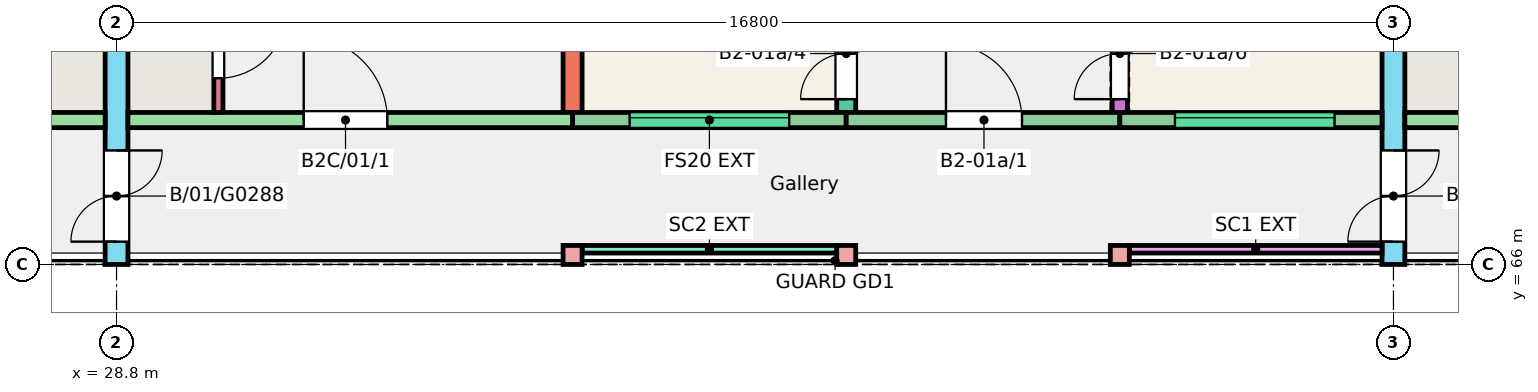
"""IFC4 building model, lengths in metres.
Left out: names, types, materials, properties, quantities, classifications, styles, units other than length and angle.
Written with IfcOpenShell. Run it as: python <this file> out.ifc"""

import sys

from ifc_helpers import new_model, si_unit, direction, frame, frame_2d, origin, origin_2d, place, context, subcontext, project, spatial, rectangle, extrude, element, fill, save


model = new_model("IFC4")
c1 = context("Model", 3, precision=1e-05, world=origin(), true_north=direction((0.0, 1.0)))
c2 = subcontext(c1, "Body", "Model", "MODEL_VIEW")
j1 = project(units=[si_unit("LENGTHUNIT", "METRE"), si_unit("PLANEANGLEUNIT", "RADIAN")], contexts=[c1])
p1 = place(None, origin())
s1 = spatial("IfcSite", under=j1, at=p1, CompositionType="ELEMENT")
p2 = place(p1, origin())
s2 = spatial("IfcBuilding", under=s1, at=p2, CompositionType="ELEMENT")
p3 = place(p2, frame((0.0, 0.0, 3.0)))
s3 = spatial("IfcBuildingStorey", under=s2, at=p3, CompositionType="ELEMENT", Elevation=3.0)
p4 = place(p3, frame((28.8, 66.0, 0.0), z_axis=(0.0, 0.0, 1.0), x_axis=(0.0, 1.0, 0.0)))
e1 = element("IfcWall", 1, at=p4, inside=s3, PredefinedType="SHEAR", context=c2, shape_type="SweptSolid", body=[
    extrude(rectangle(XDim=11.0, YDim=0.3, at=frame_2d((5.5, 0.0))), origin(), (0.0, 0.0, 1.0), 3.0),
])
p5 = place(p4, frame((0.3, 0.0, 0.0)))
e2 = element("IfcOpeningElement", 2, at=p5, cuts=e1, PredefinedType="OPENING", context=c2, shape_type="SweptSolid", body=[
    extrude(rectangle(XDim=1.2, YDim=2.1, at=frame_2d((0.6, 1.05))), frame((0.0, 0.16, 0.0), z_axis=(0.0, -1.0, 0.0), x_axis=(1.0, 0.0, 0.0)), (0.0, 0.0, 1.0), 0.32),
])
p6 = place(p3, frame((34.8, 68.0, 0.0), z_axis=(0.0, 0.0, 1.0), x_axis=(0.0, 1.0, 0.0)))
e3 = element("IfcWall", 3, at=p6, inside=s3, PredefinedType="SHEAR", context=c2, shape_type="SweptSolid", body=[
    extrude(rectangle(XDim=9.0, YDim=0.25, at=frame_2d((4.5, 0.0))), origin(), (0.0, 0.0, 1.0), 3.0),
])
p7 = place(p3, frame((38.4, 68.0, 0.0), z_axis=(0.0, 0.0, 1.0), x_axis=(0.0, 1.0, 0.0)))
e4 = element("IfcWall", 4, at=p7, inside=s3, PredefinedType="SHEAR", context=c2, shape_type="SweptSolid", body=[
    extrude(rectangle(XDim=9.0, YDim=0.25, at=frame_2d((4.5, 0.0))), origin(), (0.0, 0.0, 1.0), 3.0),
])
p8 = place(p7, frame((0.175, 0.0, 0.0)))
e5 = element("IfcOpeningElement", 5, at=p8, cuts=e4, PredefinedType="OPENING", context=c2, shape_type="SweptSolid", body=[
    extrude(rectangle(XDim=1.2, YDim=2.1, at=frame_2d((0.6, 1.05))), frame((0.0, 0.135, 0.0), z_axis=(0.0, -1.0, 0.0), x_axis=(1.0, 0.0, 0.0)), (0.0, 0.0, 1.0), 0.27),
])
p9 = place(p7, frame((6.4, 0.0, 0.0)))
e6 = element("IfcOpeningElement", 6, at=p9, cuts=e4, PredefinedType="OPENING", context=c2, shape_type="SweptSolid", body=[
    extrude(rectangle(XDim=1.2, YDim=2.1, at=frame_2d((0.6, 1.05))), frame((0.0, 0.135, 0.0), z_axis=(0.0, -1.0, 0.0), x_axis=(1.0, 0.0, 0.0)), (0.0, 0.0, 1.0), 0.27),
])
p10 = place(p3, frame((42.0, 68.0, 0.0), z_axis=(0.0, 0.0, 1.0), x_axis=(0.0, 1.0, 0.0)))
e7 = element("IfcWall", 7, at=p10, inside=s3, PredefinedType="SHEAR", context=c2, shape_type="SweptSolid", body=[
    extrude(rectangle(XDim=9.0, YDim=0.2, at=frame_2d((4.5, 0.0))), origin(), (0.0, 0.0, 1.0), 3.0),
])
p11 = place(p10, frame((0.175, 0.0, 0.0)))
e8 = element("IfcOpeningElement", 8, at=p11, cuts=e7, PredefinedType="OPENING", context=c2, shape_type="SweptSolid", body=[
    extrude(rectangle(XDim=1.2, YDim=2.1, at=frame_2d((0.6, 1.05))), frame((0.0, 0.11, 0.0), z_axis=(0.0, -1.0, 0.0), x_axis=(1.0, 0.0, 0.0)), (0.0, 0.0, 1.0), 0.22),
])
p12 = place(p10, frame((6.4, 0.0, 0.0)))
e9 = element("IfcOpeningElement", 9, at=p12, cuts=e7, PredefinedType="OPENING", context=c2, shape_type="SweptSolid", body=[
    extrude(rectangle(XDim=1.2, YDim=2.1, at=frame_2d((0.6, 1.05))), frame((0.0, 0.11, 0.0), z_axis=(0.0, -1.0, 0.0), x_axis=(1.0, 0.0, 0.0)), (0.0, 0.0, 1.0), 0.22),
])
p13 = place(p3, frame((45.6, 66.0, 0.0), z_axis=(0.0, 0.0, 1.0), x_axis=(0.0, 1.0, 0.0)))
e10 = element("IfcWall", 10, at=p13, inside=s3, PredefinedType="SHEAR", context=c2, shape_type="SweptSolid", body=[
    extrude(rectangle(XDim=11.0, YDim=0.3, at=frame_2d((5.5, 0.0))), origin(), (0.0, 0.0, 1.0), 3.0),
])
p14 = place(p13, frame((0.3, 0.0, 0.0)))
e11 = element("IfcOpeningElement", 11, at=p14, cuts=e10, PredefinedType="OPENING", context=c2, shape_type="SweptSolid", body=[
    extrude(rectangle(XDim=1.2, YDim=2.1, at=frame_2d((0.6, 1.05))), frame((0.0, 0.16, 0.0), z_axis=(0.0, -1.0, 0.0), x_axis=(1.0, 0.0, 0.0)), (0.0, 0.0, 1.0), 0.32),
])
p15 = place(p3, frame((22.8, 67.9, 0.0), z_axis=(0.0, 0.0, 1.0), x_axis=(1.0, 0.0, 0.0)))
e12 = element("IfcWall", 12, at=p15, inside=s3, PredefinedType="SHEAR", context=c2, shape_type="SweptSolid", body=[
    extrude(rectangle(XDim=5.85, YDim=0.2, at=frame_2d((2.925, 0.0))), origin(), (0.0, 0.0, 1.0), 3.0),
])
p16 = place(p15, frame((2.438, 0.0, 0.0)))
e13 = element("IfcOpeningElement", 13, at=p16, cuts=e12, PredefinedType="OPENING", context=c2, shape_type="SweptSolid", body=[
    extrude(rectangle(XDim=1.1, YDim=2.1, at=frame_2d((0.55, 1.05))), frame((0.0, 0.11, 0.0), z_axis=(0.0, -1.0, 0.0), x_axis=(1.0, 0.0, 0.0)), (0.0, 0.0, 1.0), 0.22),
])
p17 = place(p3, frame((28.95, 67.9, 0.0), z_axis=(0.0, 0.0, 1.0), x_axis=(1.0, 0.0, 0.0)))
e14 = element("IfcWall", 14, at=p17, inside=s3, PredefinedType="SHEAR", context=c2, shape_type="SweptSolid", body=[
    extrude(rectangle(XDim=5.85, YDim=0.2, at=frame_2d((2.925, 0.0))), origin(), (0.0, 0.0, 1.0), 3.0),
])
p18 = place(p17, frame((2.312, 0.0, 0.0)))
e15 = element("IfcOpeningElement", 15, at=p18, cuts=e14, PredefinedType="OPENING", context=c2, shape_type="SweptSolid", body=[
    extrude(rectangle(XDim=1.1, YDim=2.1, at=frame_2d((0.55, 1.05))), frame((0.0, 0.11, 0.0), z_axis=(0.0, -1.0, 0.0), x_axis=(1.0, 0.0, 0.0)), (0.0, 0.0, 1.0), 0.22),
])
p19 = place(p3, frame((30.14, 68.0, 0.0), z_axis=(0.0, 0.0, 1.0), x_axis=(0.0, 1.0, 0.0)))
e16 = element("IfcWall", 16, at=p19, inside=s3, PredefinedType="SHEAR", context=c2, shape_type="SweptSolid", body=[
    extrude(rectangle(XDim=1.72, YDim=0.12, at=frame_2d((0.86, 0.0))), origin(), (0.0, 0.0, 1.0), 3.0),
])
p20 = place(p19, frame((0.45, 0.0, 0.0)))
e17 = element("IfcOpeningElement", 17, at=p20, cuts=e16, PredefinedType="OPENING", context=c2, shape_type="SweptSolid", body=[
    extrude(rectangle(XDim=0.9, YDim=2.1, at=frame_2d((0.45, 1.05))), frame((0.0, 0.07, 0.0), z_axis=(0.0, -1.0, 0.0), x_axis=(1.0, 0.0, 0.0)), (0.0, 0.0, 1.0), 0.14),
])
p21 = place(p3, frame((34.8, 67.9, 0.0), z_axis=(0.0, 0.0, 1.0), x_axis=(1.0, 0.0, 0.0)))
e18 = element("IfcWall", 18, at=p21, inside=s3, PredefinedType="SOLIDWALL", context=c2, shape_type="SweptSolid", body=[
    extrude(rectangle(XDim=3.6, YDim=0.2, at=frame_2d((1.8, 0.0))), origin(), (0.0, 0.0, 1.0), 3.0),
])
p22 = place(p21, frame((0.75, 0.0, 1.2)))
e19 = element("IfcOpeningElement", 19, at=p22, cuts=e18, PredefinedType="OPENING", context=c2, shape_type="SweptSolid", body=[
    extrude(rectangle(XDim=2.1, YDim=1.2, at=frame_2d((1.05, 0.6))), frame((0.0, 0.11, 0.0), z_axis=(0.0, -1.0, 0.0), x_axis=(1.0, 0.0, 0.0)), (0.0, 0.0, 1.0), 0.22),
])
p23 = place(p3, frame((38.4, 67.9, 0.0), z_axis=(0.0, 0.0, 1.0), x_axis=(1.0, 0.0, 0.0)))
e20 = element("IfcWall", 20, at=p23, inside=s3, PredefinedType="SOLIDWALL", context=c2, shape_type="SweptSolid", body=[
    extrude(rectangle(XDim=3.6, YDim=0.2, at=frame_2d((1.8, 0.0))), origin(), (0.0, 0.0, 1.0), 3.0),
])
p24 = place(p23, frame((1.312, 0.0, 0.0)))
e21 = element("IfcOpeningElement", 21, at=p24, cuts=e20, PredefinedType="OPENING", context=c2, shape_type="SweptSolid", body=[
    extrude(rectangle(XDim=1.0, YDim=2.1, at=frame_2d((0.5, 1.05))), frame((0.0, 0.11, 0.0), z_axis=(0.0, -1.0, 0.0), x_axis=(1.0, 0.0, 0.0)), (0.0, 0.0, 1.0), 0.22),
])
p25 = place(p3, frame((42.0, 67.9, 0.0), z_axis=(0.0, 0.0, 1.0), x_axis=(1.0, 0.0, 0.0)))
e22 = element("IfcWall", 22, at=p25, inside=s3, PredefinedType="SOLIDWALL", context=c2, shape_type="SweptSolid", body=[
    extrude(rectangle(XDim=3.45, YDim=0.2, at=frame_2d((1.725, 0.0))), origin(), (0.0, 0.0, 1.0), 3.0),
])
p26 = place(p25, frame((0.725, 0.0, 1.2)))
e23 = element("IfcOpeningElement", 23, at=p26, cuts=e22, PredefinedType="OPENING", context=c2, shape_type="SweptSolid", body=[
    extrude(rectangle(XDim=2.1, YDim=1.2, at=frame_2d((1.05, 0.6))), frame((0.0, 0.11, 0.0), z_axis=(0.0, -1.0, 0.0), x_axis=(1.0, 0.0, 0.0)), (0.0, 0.0, 1.0), 0.22),
])
p27 = place(p3, frame((45.75, 67.9, 0.0), z_axis=(0.0, 0.0, 1.0), x_axis=(1.0, 0.0, 0.0)))
e24 = element("IfcWall", 24, at=p27, inside=s3, PredefinedType="SHEAR", context=c2, shape_type="SweptSolid", body=[
    extrude(rectangle(XDim=5.85, YDim=0.2, at=frame_2d((2.925, 0.0))), origin(), (0.0, 0.0, 1.0), 3.0),
])
p28 = place(p27, frame((2.312, 0.0, 0.0)))
e25 = element("IfcOpeningElement", 25, at=p28, cuts=e24, PredefinedType="OPENING", context=c2, shape_type="SweptSolid", body=[
    extrude(rectangle(XDim=1.1, YDim=2.1, at=frame_2d((0.55, 1.05))), frame((0.0, 0.11, 0.0), z_axis=(0.0, -1.0, 0.0), x_axis=(1.0, 0.0, 0.0)), (0.0, 0.0, 1.0), 0.22),
])
for number, where, z_axis, x_axis in (
    (26, (34.8, 66.125, 0.0), (0.0, 0.0, 1.0), (1.0, 0.0, 0.0)),
    (27, (38.4, 66.125, 0.0), (0.0, 0.0, 1.0), (1.0, 0.0, 0.0)),
    (28, (42.0, 66.125, 0.0), (0.0, 0.0, 1.0), (1.0, 0.0, 0.0)),
):
    element("IfcColumn", number, at=place(p3, frame(where, z_axis=z_axis, x_axis=x_axis)), inside=s3, PredefinedType="COLUMN", context=c2, shape_type="SweptSolid", body=[
        extrude(rectangle(XDim=0.25, YDim=0.25, at=origin_2d()), origin(), (0.0, 0.0, 1.0), 3.0),
    ])
p29 = place(p3, frame((34.925, 66.2, 0.0), z_axis=(0.0, 0.0, 1.0), x_axis=(1.0, 0.0, 0.0)))
e29 = element("IfcWall", 29, at=p29, inside=s3, PredefinedType="SOLIDWALL", context=c2, shape_type="SweptSolid", body=[
    extrude(rectangle(XDim=3.35, YDim=0.1, at=frame_2d((1.675, 0.0))), origin(), (0.0, 0.0, 1.0), 2.45),
])
p30 = place(p3, frame((42.125, 66.2, 0.0), z_axis=(0.0, 0.0, 1.0), x_axis=(1.0, 0.0, 0.0)))
e30 = element("IfcWall", 30, at=p30, inside=s3, PredefinedType="SOLIDWALL", context=c2, shape_type="SweptSolid", body=[
    extrude(rectangle(XDim=3.325, YDim=0.1, at=frame_2d((1.663, 0.0))), origin(), (0.0, 0.0, 1.0), 2.45),
])
p31 = place(p22, origin())
e31 = element("IfcWindow", 31, at=p31, inside=s3, PartitioningType="SINGLE_PANEL", PredefinedType="WINDOW", context=c2, shape_type="SweptSolid", body=[
    extrude(rectangle(XDim=2.1, YDim=1.2, at=frame_2d((1.05, 0.6))), frame((0.0, 0.06, 0.0), z_axis=(0.0, -1.0, 0.0), x_axis=(1.0, 0.0, 0.0)), (0.0, 0.0, 1.0), 0.06),
])
fill(e19, e31)
p32 = place(p26, origin())
e32 = element("IfcWindow", 32, at=p32, inside=s3, PartitioningType="SINGLE_PANEL", PredefinedType="WINDOW", context=c2, shape_type="SweptSolid", body=[
    extrude(rectangle(XDim=2.1, YDim=1.2, at=frame_2d((1.05, 0.6))), frame((0.0, 0.06, 0.0), z_axis=(0.0, -1.0, 0.0), x_axis=(1.0, 0.0, 0.0)), (0.0, 0.0, 1.0), 0.06),
])
fill(e23, e32)
p33 = place(p24, origin())
e33 = element("IfcDoor", 33, at=p33, inside=s3, OperationType="SINGLE_SWING_LEFT", PredefinedType="DOOR", context=c2, shape_type="SweptSolid", body=[
    extrude(rectangle(XDim=1.0, YDim=2.1, at=frame_2d((0.5, 1.05))), frame((0.0, 0.025, 0.0), z_axis=(0.0, -1.0, 0.0), x_axis=(1.0, 0.0, 0.0)), (0.0, 0.0, 1.0), 0.05),
])
fill(e21, e33)
p34 = place(p8, origin())
e34 = element("IfcDoor", 34, at=p34, inside=s3, OperationType="DOUBLE_DOOR_SINGLE_SWING", PredefinedType="DOOR", context=c2, shape_type="SweptSolid", body=[
    extrude(rectangle(XDim=1.2, YDim=2.1, at=frame_2d((0.6, 1.05))), frame((0.0, 0.025, 0.0), z_axis=(0.0, -1.0, 0.0), x_axis=(1.0, 0.0, 0.0)), (0.0, 0.0, 1.0), 0.05),
])
fill(e5, e34)
p35 = place(p11, origin())
e35 = element("IfcDoor", 35, at=p35, inside=s3, OperationType="DOUBLE_DOOR_SINGLE_SWING", PredefinedType="DOOR", context=c2, shape_type="SweptSolid", body=[
    extrude(rectangle(XDim=1.2, YDim=2.1, at=frame_2d((0.6, 1.05))), frame((0.0, 0.025, 0.0), z_axis=(0.0, -1.0, 0.0), x_axis=(1.0, 0.0, 0.0)), (0.0, 0.0, 1.0), 0.05),
])
fill(e8, e35)
p36 = place(p18, origin())
e36 = element("IfcDoor", 36, at=p36, inside=s3, OperationType="SINGLE_SWING_LEFT", PredefinedType="DOOR", context=c2, shape_type="SweptSolid", body=[
    extrude(rectangle(XDim=1.1, YDim=2.1, at=frame_2d((0.55, 1.05))), frame((0.0, 0.025, 0.0), z_axis=(0.0, -1.0, 0.0), x_axis=(1.0, 0.0, 0.0)), (0.0, 0.0, 1.0), 0.05),
])
fill(e15, e36)
p37 = place(p20, origin())
e37 = element("IfcDoor", 37, at=p37, inside=s3, OperationType="SINGLE_SWING_RIGHT", PredefinedType="DOOR", context=c2, shape_type="SweptSolid", body=[
    extrude(rectangle(XDim=0.9, YDim=2.1, at=frame_2d((0.45, 1.05))), frame((0.0, 0.025, 0.0), z_axis=(0.0, -1.0, 0.0), x_axis=(1.0, 0.0, 0.0)), (0.0, 0.0, 1.0), 0.05),
])
fill(e17, e37)
p38 = place(p5, origin())
e38 = element("IfcDoor", 38, at=p38, inside=s3, OperationType="DOUBLE_DOOR_SINGLE_SWING", PredefinedType="DOOR", context=c2, shape_type="SweptSolid", body=[
    extrude(rectangle(XDim=1.2, YDim=2.1, at=frame_2d((0.6, 1.05))), frame((0.0, 0.025, 0.0), z_axis=(0.0, -1.0, 0.0), x_axis=(1.0, 0.0, 0.0)), (0.0, 0.0, 1.0), 0.05),
])
fill(e2, e38)
p39 = place(p14, origin())
e39 = element("IfcDoor", 39, at=p39, inside=s3, OperationType="DOUBLE_DOOR_SINGLE_SWING", PredefinedType="DOOR", context=c2, shape_type="SweptSolid", body=[
    extrude(rectangle(XDim=1.2, YDim=2.1, at=frame_2d((0.6, 1.05))), frame((0.0, 0.025, 0.0), z_axis=(0.0, -1.0, 0.0), x_axis=(1.0, 0.0, 0.0)), (0.0, 0.0, 1.0), 0.05),
])
fill(e11, e39)
save(model, sys.argv[1])
